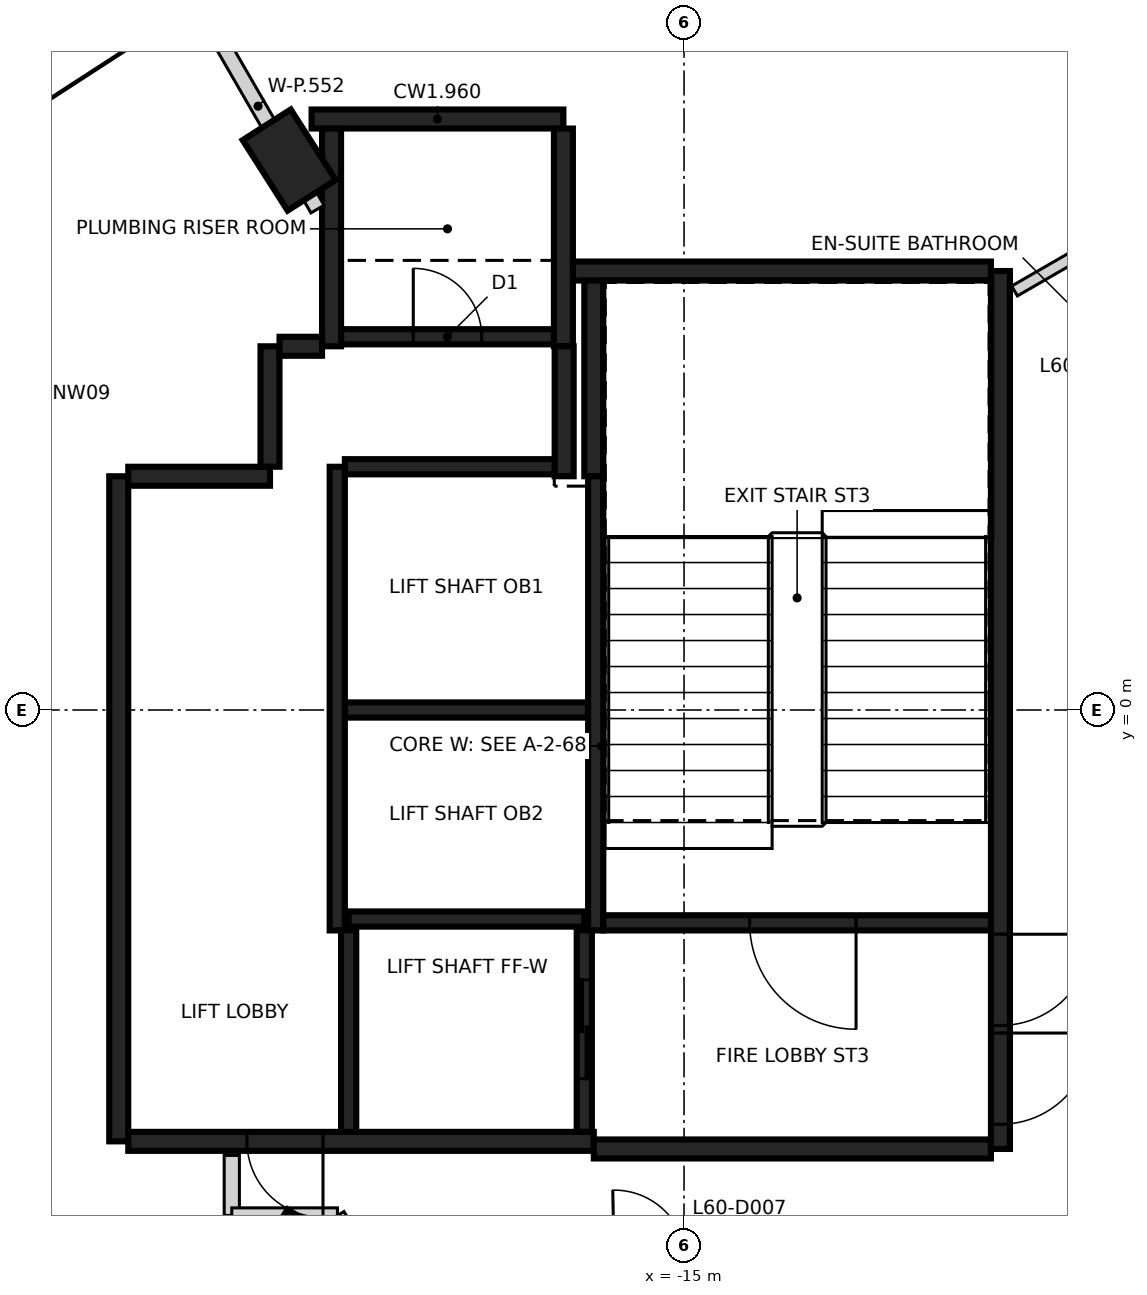
"""IFC4 building model, lengths in metres.
Left out: names, types, materials, properties, quantities, classifications, styles, units other than length and angle.
Written with IfcOpenShell. Run it as: python <this file> out.ifc"""

import sys

from ifc_helpers import new_model, si_unit, direction, frame, frame_2d, origin, origin_2d, place, context, subcontext, project, spatial, rectangle, extrude, element, fill, save


model = new_model("IFC4")
c1 = context("Model", 3, precision=1e-05, world=origin(), true_north=direction((0.0, 1.0)))
c2 = subcontext(c1, "Body", "Model", "MODEL_VIEW")
j1 = project(units=[si_unit("LENGTHUNIT", "METRE"), si_unit("PLANEANGLEUNIT", "RADIAN")], contexts=[c1])
p1 = place(None, origin())
s1 = spatial("IfcSite", under=j1, at=p1, CompositionType="ELEMENT")
p2 = place(p1, origin())
s2 = spatial("IfcBuilding", under=s1, at=p2, CompositionType="ELEMENT")
p3 = place(p2, frame((0.0, 0.0, 239.4)))
s3 = spatial("IfcBuildingStorey", under=s2, at=p3, CompositionType="ELEMENT", Elevation=239.4)
for number, where, z_axis, x_axis in (
    (1, (-20.195, 7.235, -0.35), (0.0, 0.0, 1.0), (-0.538, 0.843, 0.0)),
    (2, (-20.195, -7.235, -0.35), (0.0, 0.0, 1.0), (0.538, 0.843, 0.0)),
):
    element("IfcColumn", number, at=place(p3, frame(where, z_axis=z_axis, x_axis=x_axis)), inside=s3, PredefinedType="COLUMN", context=c2, shape_type="SweptSolid", body=[
        extrude(rectangle(XDim=1.1, YDim=0.75, at=origin_2d()), origin(), (0.0, 0.0, 1.0), 3.6),
    ])
p4 = place(p3, frame((-10.837, 5.775, 0.0), z_axis=(0.0, 0.0, 1.0), x_axis=(0.0, -1.0, 0.0)))
e3 = element("IfcWall", 3, at=p4, inside=s3, PredefinedType="SHEAR", context=c2, shape_type="SweptSolid", body=[
    extrude(rectangle(XDim=11.55, YDim=0.25, at=frame_2d((5.775, 0.0))), origin(), (0.0, 0.0, 1.0), 3.25),
])
p5 = place(p4, frame((10.025, 0.0, 0.0)))
e4 = element("IfcOpeningElement", 4, at=p5, cuts=e3, PredefinedType="OPENING", context=c2, shape_type="SweptSolid", body=[
    extrude(rectangle(XDim=1.2, YDim=2.1, at=frame_2d((0.6, 1.05))), frame((0.0, 0.135, 0.0), z_axis=(0.0, -1.0, 0.0), x_axis=(1.0, 0.0, 0.0)), (0.0, 0.0, 1.0), 0.27),
])
p6 = place(p4, frame((8.725, 0.0, 0.0)))
e5 = element("IfcOpeningElement", 5, at=p6, cuts=e3, PredefinedType="OPENING", context=c2, shape_type="SweptSolid", body=[
    extrude(rectangle(XDim=1.2, YDim=2.1, at=frame_2d((0.6, 1.05))), frame((0.0, 0.135, 0.0), z_axis=(0.0, -1.0, 0.0), x_axis=(1.0, 0.0, 0.0)), (0.0, 0.0, 1.0), 0.27),
])
p7 = place(p3, frame((-22.437, -5.675, 0.0), z_axis=(0.0, 0.0, 1.0), x_axis=(0.0, 1.0, 0.0)))
e6 = element("IfcWall", 6, at=p7, inside=s3, PredefinedType="SHEAR", context=c2, shape_type="SweptSolid", body=[
    extrude(rectangle(XDim=8.75, YDim=0.25, at=frame_2d((4.375, 0.0))), origin(), (0.0, 0.0, 1.0), 3.25),
])
p8 = place(p3, frame((-16.187, -5.675, 0.0), z_axis=(0.0, 0.0, 1.0), x_axis=(-1.0, 0.0, 0.0)))
e7 = element("IfcWall", 7, at=p8, inside=s3, PredefinedType="SHEAR", context=c2, shape_type="SweptSolid", body=[
    extrude(rectangle(XDim=6.125, YDim=0.25, at=frame_2d((3.062, 0.0))), origin(), (0.0, 0.0, 1.0), 3.25),
])
p9 = place(p8, frame((3.563, 0.0, 0.0)))
e8 = element("IfcOpeningElement", 8, at=p9, cuts=e7, PredefinedType="OPENING", context=c2, shape_type="SweptSolid", body=[
    extrude(rectangle(XDim=1.0, YDim=2.1, at=frame_2d((0.5, 1.05))), frame((0.0, 0.135, 0.0), z_axis=(0.0, -1.0, 0.0), x_axis=(1.0, 0.0, 0.0)), (0.0, 0.0, 1.0), 0.27),
])
p10 = place(p3, frame((-10.963, -5.775, 0.0), z_axis=(0.0, 0.0, 1.0), x_axis=(-1.0, 0.0, 0.0)))
e9 = element("IfcWall", 9, at=p10, inside=s3, PredefinedType="SHEAR", context=c2, shape_type="SweptSolid", body=[
    extrude(rectangle(XDim=5.225, YDim=0.25, at=frame_2d((2.612, 0.0))), origin(), (0.0, 0.0, 1.0), 3.25),
])
p11 = place(p3, frame((-16.472, 5.775, 0.0), z_axis=(0.0, 0.0, 1.0), x_axis=(1.0, 0.0, 0.0)))
e10 = element("IfcWall", 10, at=p11, inside=s3, PredefinedType="SHEAR", context=c2, shape_type="SweptSolid", body=[
    extrude(rectangle(XDim=5.51, YDim=0.25, at=frame_2d((2.755, 0.0))), origin(), (0.0, 0.0, 1.0), 3.25),
])
p12 = place(p3, frame((-19.9, 7.775, 0.0), z_axis=(0.0, 0.0, 1.0), x_axis=(1.0, 0.0, 0.0)))
e11 = element("IfcWall", 11, at=p12, inside=s3, PredefinedType="SHEAR", context=c2, shape_type="SweptSolid", body=[
    extrude(rectangle(XDim=3.313, YDim=0.25, at=frame_2d((1.656, 0.0))), origin(), (0.0, 0.0, 1.0), 3.25),
])
for number, where, z_axis, x_axis in (
    (12, (-16.587, 7.65, 0.0), (0.0, 0.0, 1.0), (0.0, -1.0, 0.0)),
    (13, (-19.637, 4.785, 0.0), (0.0, 0.0, 1.0), (0.0, 1.0, 0.0)),
):
    element("IfcWall", number, at=place(p3, frame(where, z_axis=z_axis, x_axis=x_axis)), inside=s3, PredefinedType="SHEAR", context=c2, shape_type="SweptSolid", body=[
        extrude(rectangle(XDim=2.865, YDim=0.25, at=frame_2d((1.432, 0.0))), origin(), (0.0, 0.0, 1.0), 3.25),
    ])
p13 = place(p3, frame((-16.187, 3.075, 0.0), z_axis=(0.0, 0.0, 1.0), x_axis=(0.0, 1.0, 0.0)))
e14 = element("IfcWall", 14, at=p13, inside=s3, PredefinedType="SHEAR", context=c2, shape_type="SweptSolid", body=[
    extrude(rectangle(XDim=2.575, YDim=0.25, at=frame_2d((1.287, 0.0))), origin(), (0.0, 0.0, 1.0), 3.25),
])
p14 = place(p3, frame((-22.312, 3.075, 0.0), z_axis=(0.0, 0.0, 1.0), x_axis=(1.0, 0.0, 0.0)))
e15 = element("IfcWall", 15, at=p14, inside=s3, PredefinedType="SHEAR", context=c2, shape_type="SweptSolid", body=[
    extrude(rectangle(XDim=1.865, YDim=0.25, at=frame_2d((0.932, 0.0))), origin(), (0.0, 0.0, 1.0), 3.25),
])
p15 = place(p3, frame((-16.577, 4.785, 0.0), z_axis=(0.0, 0.0, 1.0), x_axis=(0.0, -1.0, 0.0)))
e16 = element("IfcWall", 16, at=p15, inside=s3, PredefinedType="SHEAR", context=c2, shape_type="SweptSolid", body=[
    extrude(rectangle(XDim=1.71, YDim=0.25, at=frame_2d((0.855, 0.0))), origin(), (0.0, 0.0, 1.0), 3.25),
])
p16 = place(p3, frame((-20.447, 3.2, 0.0), z_axis=(0.0, 0.0, 1.0), x_axis=(0.0, 1.0, 0.0)))
e17 = element("IfcWall", 17, at=p16, inside=s3, PredefinedType="SHEAR", context=c2, shape_type="SweptSolid", body=[
    extrude(rectangle(XDim=1.584, YDim=0.25, at=frame_2d((0.792, 0.0))), origin(), (0.0, 0.0, 1.0), 3.25),
])
p17 = place(p3, frame((-20.322, 4.785, 0.0), z_axis=(0.0, 0.0, 1.0), x_axis=(1.0, 0.0, 0.0)))
e18 = element("IfcWall", 18, at=p17, inside=s3, PredefinedType="SHEAR", context=c2, shape_type="SweptSolid", body=[
    extrude(rectangle(XDim=0.559, YDim=0.25, at=frame_2d((0.28, 0.0))), origin(), (0.0, 0.0, 1.0), 3.25),
])
p18 = place(p3, frame((-16.162, 3.074, 0.0), z_axis=(0.0, 0.0, 1.0), x_axis=(0.0, -1.0, 0.0)))
e19 = element("IfcWall", 19, at=p18, inside=s3, PredefinedType="SHEAR", context=c2, shape_type="SweptSolid", body=[
    extrude(rectangle(XDim=5.974, YDim=0.2, at=frame_2d((2.987, 0.0))), origin(), (0.0, 0.0, 1.0), 3.25),
])
p19 = place(p3, frame((-19.562, -2.9, 0.0), z_axis=(0.0, 0.0, 1.0), x_axis=(0.0, 1.0, 0.0)))
e20 = element("IfcWall", 20, at=p19, inside=s3, PredefinedType="SHEAR", context=c2, shape_type="SweptSolid", body=[
    extrude(rectangle(XDim=6.1, YDim=0.2, at=frame_2d((3.05, 0.0))), origin(), (0.0, 0.0, 1.0), 3.25),
])
p20 = place(p3, frame((-10.963, -2.8, 0.0), z_axis=(0.0, 0.0, 1.0), x_axis=(-1.0, 0.0, 0.0)))
e21 = element("IfcWall", 21, at=p20, inside=s3, PredefinedType="SHEAR", context=c2, shape_type="SweptSolid", body=[
    extrude(rectangle(XDim=5.098, YDim=0.2, at=frame_2d((2.549, 0.0))), origin(), (0.0, 0.0, 1.0), 3.25),
])
p21 = place(p20, frame((1.774, 0.0, 0.0)))
e22 = element("IfcOpeningElement", 22, at=p21, cuts=e21, PredefinedType="OPENING", context=c2, shape_type="SweptSolid", body=[
    extrude(rectangle(XDim=1.4, YDim=2.1, at=frame_2d((0.7, 1.05))), frame((0.0, 0.11, 0.0), z_axis=(0.0, -1.0, 0.0), x_axis=(1.0, 0.0, 0.0)), (0.0, 0.0, 1.0), 0.22),
])
p22 = place(p3, frame((-16.263, 0.0, 0.0), z_axis=(0.0, 0.0, 1.0), x_axis=(-1.0, 0.0, 0.0)))
e23 = element("IfcWall", 23, at=p22, inside=s3, PredefinedType="SHEAR", context=c2, shape_type="SweptSolid", body=[
    extrude(rectangle(XDim=3.198, YDim=0.2, at=frame_2d((1.599, 0.0))), origin(), (0.0, 0.0, 1.0), 3.25),
])
p23 = place(p3, frame((-19.511, 4.91, 0.0), z_axis=(0.0, 0.0, 1.0), x_axis=(1.0, 0.0, 0.0)))
e24 = element("IfcWall", 24, at=p23, inside=s3, PredefinedType="SHEAR", context=c2, shape_type="SweptSolid", body=[
    extrude(rectangle(XDim=2.798, YDim=0.2, at=frame_2d((1.399, 0.0))), origin(), (0.0, 0.0, 1.0), 3.25),
])
p24 = place(p23, frame((0.949, 0.0, 0.0)))
e25 = element("IfcOpeningElement", 25, at=p24, cuts=e24, PredefinedType="OPENING", context=c2, shape_type="SweptSolid", body=[
    extrude(rectangle(XDim=0.9, YDim=2.1, at=frame_2d((0.45, 1.05))), frame((0.0, 0.11, 0.0), z_axis=(0.0, -1.0, 0.0), x_axis=(1.0, 0.0, 0.0)), (0.0, 0.0, 1.0), 0.22),
])
p25 = place(p3, frame((-19.462, 3.2, 0.0), z_axis=(0.0, 0.0, 1.0), x_axis=(1.0, 0.0, 0.0)))
e26 = element("IfcWall", 26, at=p25, inside=s3, PredefinedType="SHEAR", context=c2, shape_type="SweptSolid", body=[
    extrude(rectangle(XDim=2.759, YDim=0.2, at=frame_2d((1.379, 0.0))), origin(), (0.0, 0.0, 1.0), 3.25),
])
p26 = place(p3, frame((-19.412, -2.75, 0.0), z_axis=(0.0, 0.0, 1.0), x_axis=(1.0, 0.0, 0.0)))
e27 = element("IfcWall", 27, at=p26, inside=s3, PredefinedType="SHEAR", context=c2, shape_type="SweptSolid", body=[
    extrude(rectangle(XDim=3.1, YDim=0.2, at=frame_2d((1.55, 0.0))), origin(), (0.0, 0.0, 1.0), 3.25),
])
p27 = place(p3, frame((-16.312, -2.898, 0.0), z_axis=(0.0, 0.0, 1.0), x_axis=(0.0, -1.0, 0.0)))
e28 = element("IfcWall", 28, at=p27, inside=s3, PredefinedType="SHEAR", context=c2, shape_type="SweptSolid", body=[
    extrude(rectangle(XDim=2.651, YDim=0.2, at=frame_2d((1.325, 0.0))), origin(), (0.0, 0.0, 1.0), 3.25),
])
p28 = place(p27, frame((0.652, 0.0, 0.0)))
e29 = element("IfcOpeningElement", 29, at=p28, cuts=e28, PredefinedType="OPENING", context=c2, shape_type="SweptSolid", body=[
    extrude(rectangle(XDim=1.3, YDim=2.1, at=frame_2d((0.65, 1.05))), frame((0.0, 0.11, 0.0), z_axis=(0.0, -1.0, 0.0), x_axis=(1.0, 0.0, 0.0)), (0.0, 0.0, 1.0), 0.22),
])
p29 = place(p3, frame((-19.412, -5.549, 0.0), z_axis=(0.0, 0.0, 1.0), x_axis=(0.0, 1.0, 0.0)))
e30 = element("IfcWall", 30, at=p29, inside=s3, PredefinedType="SHEAR", context=c2, shape_type="SweptSolid", body=[
    extrude(rectangle(XDim=2.651, YDim=0.2, at=frame_2d((1.325, 0.0))), origin(), (0.0, 0.0, 1.0), 3.25),
])
p30 = place(p3, frame((-20.95, -6.65, 0.0), z_axis=(0.0, 0.0, 1.0), x_axis=(0.0, 1.0, 0.0)))
e31 = element("IfcWall", 31, at=p30, inside=s3, PredefinedType="PARTITIONING", context=c2, shape_type="SweptSolid", body=[
    extrude(rectangle(XDim=0.79, YDim=0.2, at=frame_2d((0.395, 0.0))), origin(), (0.0, 0.0, 1.0), 2.35),
])
p31 = place(p3, frame((-20.95, -6.65, 0.0), z_axis=(0.0, 0.0, 1.0), x_axis=(1.0, 0.0, 0.0)))
e32 = element("IfcWall", 32, at=p31, inside=s3, PredefinedType="PARTITIONING", context=c2, shape_type="SweptSolid", body=[
    extrude(rectangle(XDim=1.39, YDim=0.2, at=frame_2d((0.695, 0.0))), origin(), (0.0, 0.0, 1.0), 2.35),
])
p32 = place(p3, frame((-19.56, -6.65, 0.0), z_axis=(0.0, 0.0, 1.0), x_axis=(0.517618709346, -0.855611402294, 0.0)))
e33 = element("IfcWall", 33, at=p32, inside=s3, PredefinedType="PARTITIONING", context=c2, shape_type="SweptSolid", body=[
    extrude(rectangle(XDim=0.792, YDim=0.2, at=frame_2d((0.396, 0.0))), origin(), (0.0, 0.0, 1.0), 3.25),
])
p33 = place(p3, frame((-9.931, -7.149, 0.0), z_axis=(0.0, 0.0, 1.0), x_axis=(0.499934418432, 0.86606326401, 0.0)))
e34 = element("IfcWall", 34, at=p33, inside=s3, PredefinedType="PARTITIONING", context=c2, shape_type="SweptSolid", body=[
    extrude(rectangle(XDim=3.556, YDim=0.2, at=frame_2d((1.778, 0.0))), origin(), (0.0, 0.0, 1.0), 3.25),
])
p34 = place(p3, frame((-21.386, 9.298, 0.0), z_axis=(0.0, 0.0, 1.0), x_axis=(0.500017489778, -0.866015305821, 0.0)))
e35 = element("IfcWall", 35, at=p34, inside=s3, PredefinedType="PARTITIONING", context=c2, shape_type="SweptSolid", body=[
    extrude(rectangle(XDim=3.128, YDim=0.2, at=frame_2d((1.564, 0.0))), origin(), (0.0, 0.0, 1.0), 3.25),
])
p35 = place(p3, frame((-12.407, -14.806, 0.0), z_axis=(0.0, 0.0, 1.0), x_axis=(0.500104175471, 0.865965249693, 0.0)))
e36 = element("IfcWall", 36, at=p35, inside=s3, PredefinedType="PARTITIONING", context=c2, shape_type="SweptSolid", body=[
    extrude(rectangle(XDim=11.423, YDim=0.2, at=frame_2d((5.711, 0.0))), origin(), (0.0, 0.0, 1.0), 2.35),
])
p36 = place(p3, frame((-10.652, 5.512, 0.0), z_axis=(0.0, 0.0, 1.0), x_axis=(0.866017156151, 0.500014285048, 0.0)))
e37 = element("IfcWall", 37, at=p36, inside=s3, PredefinedType="PARTITIONING", context=c2, shape_type="SweptSolid", body=[
    extrude(rectangle(XDim=1.931, YDim=0.15, at=frame_2d((0.966, 0.0))), origin(), (0.0, 0.0, 1.0), 3.25),
])
p37 = place(p28, origin())
e38 = element("IfcDoor", 38, at=p37, inside=s3, OperationType="SLIDING_TO_LEFT", PredefinedType="DOOR", context=c2, shape_type="SweptSolid", body=[
    extrude(rectangle(XDim=1.3, YDim=2.1, at=frame_2d((0.65, 1.05))), frame((0.0, 0.025, 0.0), z_axis=(0.0, -1.0, 0.0), x_axis=(1.0, 0.0, 0.0)), (0.0, 0.0, 1.0), 0.05),
])
fill(e29, e38)
p38 = place(p9, origin())
e39 = element("IfcDoor", 39, at=p38, inside=s3, OperationType="SINGLE_SWING_LEFT", PredefinedType="DOOR", context=c2, shape_type="SweptSolid", body=[
    extrude(rectangle(XDim=1.0, YDim=2.1, at=frame_2d((0.5, 1.05))), frame((0.0, 0.025, 0.0), z_axis=(0.0, -1.0, 0.0), x_axis=(1.0, 0.0, 0.0)), (0.0, 0.0, 1.0), 0.05),
])
fill(e8, e39)
p39 = place(p5, origin())
e40 = element("IfcDoor", 40, at=p39, inside=s3, OperationType="SINGLE_SWING_LEFT", PredefinedType="DOOR", context=c2, shape_type="SweptSolid", body=[
    extrude(rectangle(XDim=1.2, YDim=2.1, at=frame_2d((0.6, 1.05))), frame((0.0, 0.025, 0.0), z_axis=(0.0, -1.0, 0.0), x_axis=(1.0, 0.0, 0.0)), (0.0, 0.0, 1.0), 0.05),
])
fill(e4, e40)
p40 = place(p6, origin())
e41 = element("IfcDoor", 41, at=p40, inside=s3, OperationType="SINGLE_SWING_RIGHT", PredefinedType="DOOR", context=c2, shape_type="SweptSolid", body=[
    extrude(rectangle(XDim=1.2, YDim=2.1, at=frame_2d((0.6, 1.05))), frame((0.0, 0.025, 0.0), z_axis=(0.0, -1.0, 0.0), x_axis=(1.0, 0.0, 0.0)), (0.0, 0.0, 1.0), 0.05),
])
fill(e5, e41)
p41 = place(p21, origin())
e42 = element("IfcDoor", 42, at=p41, inside=s3, OperationType="SINGLE_SWING_LEFT", PredefinedType="DOOR", context=c2, shape_type="SweptSolid", body=[
    extrude(rectangle(XDim=1.4, YDim=2.1, at=frame_2d((0.7, 1.05))), frame((0.0, 0.025, 0.0), z_axis=(0.0, -1.0, 0.0), x_axis=(1.0, 0.0, 0.0)), (0.0, 0.0, 1.0), 0.05),
])
fill(e22, e42)
p42 = place(p24, origin())
e43 = element("IfcDoor", 43, at=p42, inside=s3, OperationType="SINGLE_SWING_RIGHT", PredefinedType="DOOR", context=c2, shape_type="SweptSolid", body=[
    extrude(rectangle(XDim=0.9, YDim=2.1, at=frame_2d((0.45, 1.05))), frame((0.0, 0.025, 0.0), z_axis=(0.0, -1.0, 0.0), x_axis=(1.0, 0.0, 0.0)), (0.0, 0.0, 1.0), 0.05),
])
fill(e25, e43)
save(model, sys.argv[1])
